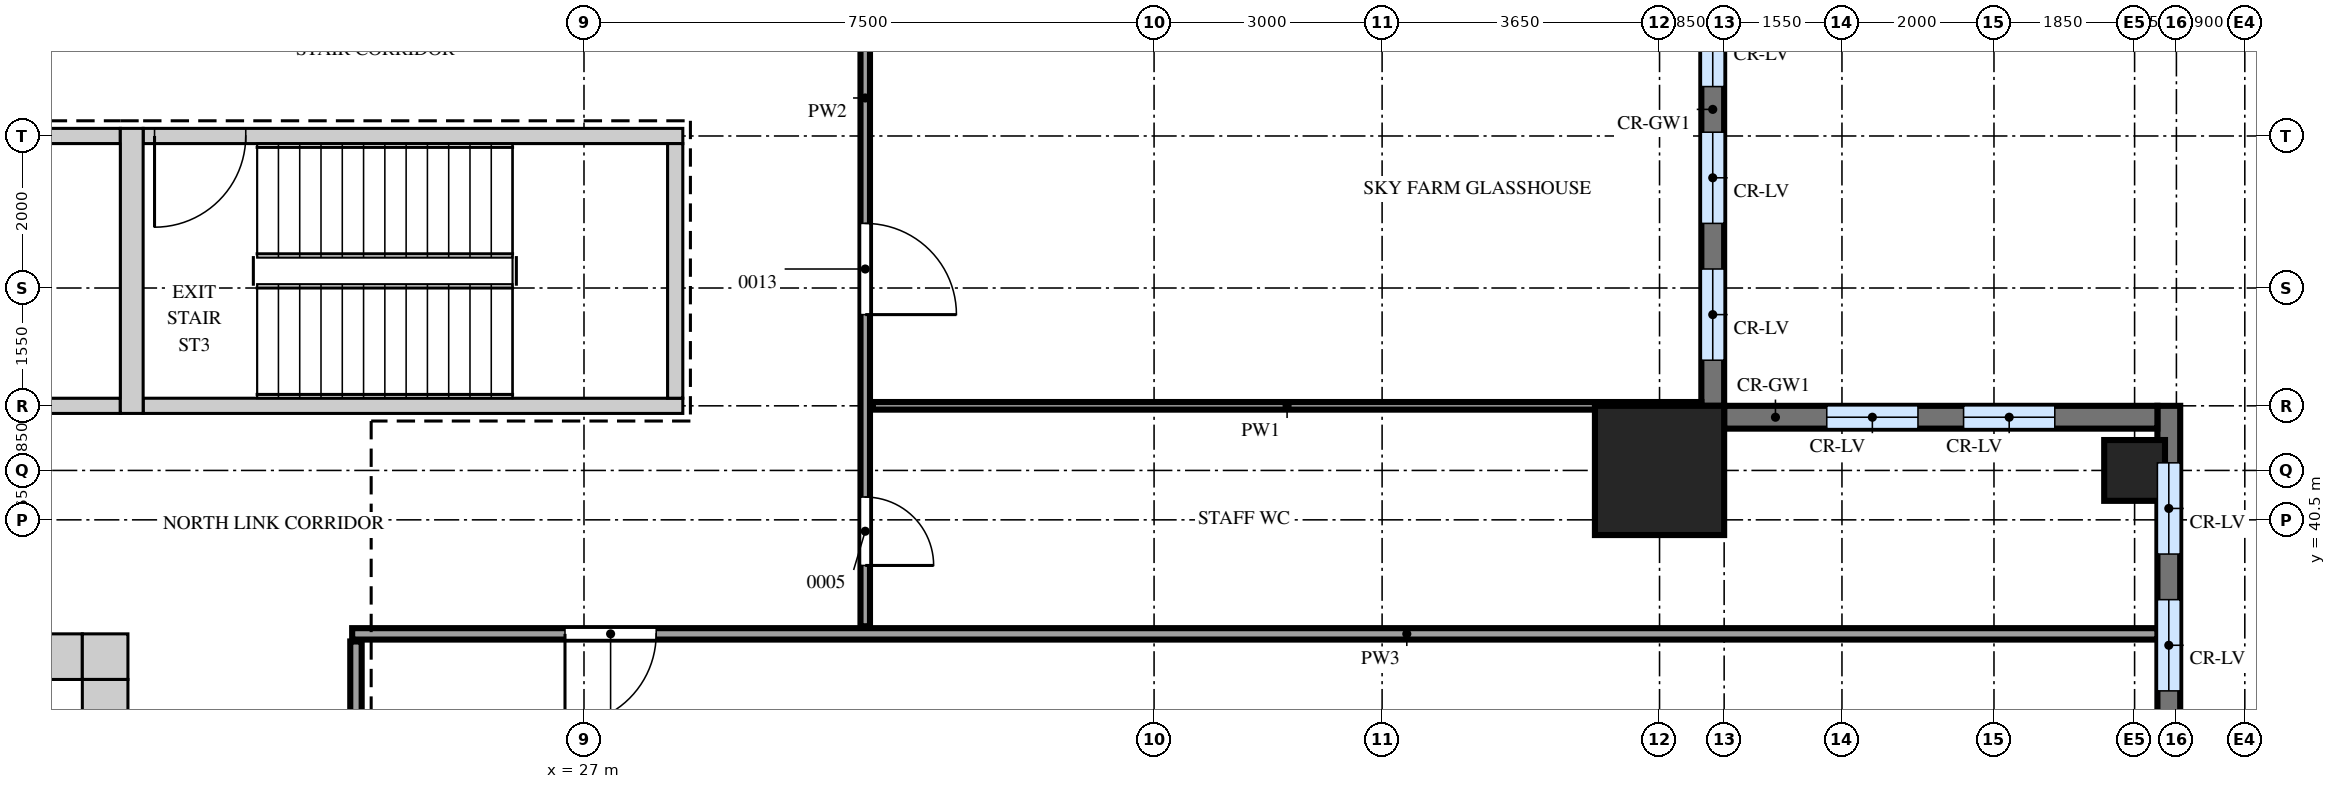
"""IFC4 building model, lengths in metres.
Left out: names, types, materials, properties, quantities, classifications, styles, units other than length and angle.
Written with IfcOpenShell. Run it as: python <this file> out.ifc"""

import sys

from ifc_helpers import new_model, si_unit, direction, frame, frame_2d, origin, origin_2d, place, context, subcontext, project, spatial, rectangle, extrude, source, transform, mapped, element, fill, save


model = new_model("IFC4")
c1 = context("Model", 3, precision=1e-05, world=origin(), true_north=direction((0.0, 1.0)))
c2 = subcontext(c1, "Body", "Model", "MODEL_VIEW")
j1 = project(units=[si_unit("LENGTHUNIT", "METRE"), si_unit("PLANEANGLEUNIT", "RADIAN")], contexts=[c1])
p1 = place(None, origin())
s1 = spatial("IfcSite", under=j1, at=p1, CompositionType="ELEMENT")
p2 = place(p1, origin())
s2 = spatial("IfcBuilding", under=s1, at=p2, CompositionType="ELEMENT")
p3 = place(p2, frame((0.0, 0.0, 330.2)))
s3 = spatial("IfcBuildingStorey", under=s2, at=p3, CompositionType="ELEMENT", Elevation=330.2)
m1 = source(origin(), c2, "Body", "SweptSolid", [
    extrude(rectangle(XDim=14.4, YDim=0.6, at=frame_2d((7.2, 0.0))), origin(), (0.0, 0.0, 1.0), 4.25),
])
p4 = place(p3, frame((6.0, 38.7, 0.0), z_axis=(0.0, 0.0, 1.0), x_axis=(1.0, 0.0, 0.0)))
e1 = element("IfcWall", 1, at=p4, inside=s3, PredefinedType="SHEAR", context=c2, shape_type="MappedRepresentation", body=[
    mapped(m1, transform((0.0, 0.0, 0.0))),
])
m2 = source(origin(), c2, "Body", "SweptSolid", [
    extrude(rectangle(XDim=0.9, YDim=2.1, at=frame_2d((0.45, 1.05))), frame((0.0, 0.31, 0.0), z_axis=(0.0, -1.0, 0.0), x_axis=(1.0, 0.0, 0.0)), (0.0, 0.0, 1.0), 0.62),
])
p5 = place(p4, frame((3.7, 0.0, 0.0)))
e2 = element("IfcOpeningElement", 2, at=p5, cuts=e1, PredefinedType="OPENING", context=c2, shape_type="MappedRepresentation", body=[
    mapped(m2, transform((0.0, 0.0, 0.0))),
])
p6 = place(p4, frame((10.4, 0.0, 0.0)))
e3 = element("IfcOpeningElement", 3, at=p6, cuts=e1, PredefinedType="OPENING", context=c2, shape_type="MappedRepresentation", body=[
    mapped(m2, transform((0.0, 0.0, 0.0))),
])
m3 = source(origin(), c2, "Body", "SweptSolid", [
    extrude(rectangle(XDim=0.6, YDim=0.6, at=frame_2d((0.3, 0.0))), origin(), (0.0, 0.0, 1.0), 4.25),
])
p7 = place(p3, frame((20.4, 38.7, 0.0), z_axis=(0.0, 0.0, 1.0), x_axis=(1.0, 0.0, 0.0)))
e4 = element("IfcWall", 4, at=p7, inside=s3, PredefinedType="SHEAR", context=c2, shape_type="MappedRepresentation", body=[
    mapped(m3, transform((0.0, 0.0, 0.0))),
])
m4 = source(origin(), c2, "Body", "SweptSolid", [
    extrude(rectangle(XDim=22.8, YDim=0.6, at=frame_2d((11.4, 0.0))), origin(), (0.0, 0.0, 1.0), 4.25),
])
p8 = place(p3, frame((20.7, 15.6, 0.0), z_axis=(0.0, 0.0, 1.0), x_axis=(0.0, 1.0, 0.0)))
e5 = element("IfcWall", 5, at=p8, inside=s3, PredefinedType="SHEAR", context=c2, shape_type="MappedRepresentation", body=[
    mapped(m4, transform((0.0, 0.0, 0.0))),
])
p9 = place(p8, frame((11.35, 0.0, 0.0)))
e6 = element("IfcOpeningElement", 6, at=p9, cuts=e5, PredefinedType="OPENING", context=c2, shape_type="MappedRepresentation", body=[
    mapped(m2, transform((0.0, 0.0, 0.0))),
])
p10 = place(p8, frame((1.55, 0.0, 0.0)))
e7 = element("IfcOpeningElement", 7, at=p10, cuts=e5, PredefinedType="OPENING", context=c2, shape_type="MappedRepresentation", body=[
    mapped(m2, transform((0.0, 0.0, 0.0))),
])
p11 = place(p8, frame((5.1, 0.0, 0.0)))
e8 = element("IfcOpeningElement", 8, at=p11, cuts=e5, PredefinedType="OPENING", context=c2, shape_type="MappedRepresentation", body=[
    mapped(m2, transform((0.0, 0.0, 0.0))),
])
m5 = source(origin(), c2, "Body", "SweptSolid", [
    extrude(rectangle(XDim=7.0, YDim=0.2, at=frame_2d((3.5, 0.0))), origin(), (0.0, 0.0, 1.0), 4.25),
])
p12 = place(p3, frame((13.9, 45.55, 0.0), z_axis=(0.0, 0.0, 1.0), x_axis=(1.0, 0.0, 0.0)))
e9 = element("IfcWall", 9, at=p12, inside=s3, PredefinedType="SHEAR", context=c2, shape_type="MappedRepresentation", body=[
    mapped(m5, transform((0.0, 0.0, 0.0))),
])
m6 = source(origin(), c2, "Body", "SweptSolid", [
    extrude(rectangle(XDim=1.2, YDim=2.1, at=frame_2d((0.6, 1.05))), frame((0.0, 0.11, 0.0), z_axis=(0.0, -1.0, 0.0), x_axis=(1.0, 0.0, 0.0)), (0.0, 0.0, 1.0), 0.22),
])
p13 = place(p12, frame((0.35, 0.0, 0.0)))
e10 = element("IfcOpeningElement", 10, at=p13, cuts=e9, PredefinedType="OPENING", context=c2, shape_type="MappedRepresentation", body=[
    mapped(m6, transform((0.0, 0.0, 0.0))),
])
p14 = place(p3, frame((13.9, 42.0, 0.0), z_axis=(0.0, 0.0, 1.0), x_axis=(1.0, 0.0, 0.0)))
e11 = element("IfcWall", 11, at=p14, inside=s3, PredefinedType="SHEAR", context=c2, shape_type="MappedRepresentation", body=[
    mapped(m5, transform((0.0, 0.0, 0.0))),
])
m7 = source(origin(), c2, "Body", "SweptSolid", [
    extrude(rectangle(XDim=7.1, YDim=0.2, at=frame_2d((3.55, 0.0))), origin(), (0.0, 0.0, 1.0), 4.25),
])
p15 = place(p3, frame((21.2, 45.55, 0.0), z_axis=(0.0, 0.0, 1.0), x_axis=(1.0, 0.0, 0.0)))
e12 = element("IfcWall", 12, at=p15, inside=s3, PredefinedType="SHEAR", context=c2, shape_type="MappedRepresentation", body=[
    mapped(m7, transform((0.0, 0.0, 0.0))),
])
p16 = place(p15, frame((0.15, 0.0, 0.0)))
e13 = element("IfcOpeningElement", 13, at=p16, cuts=e12, PredefinedType="OPENING", context=c2, shape_type="MappedRepresentation", body=[
    mapped(m6, transform((0.0, 0.0, 0.0))),
])
p17 = place(p3, frame((21.2, 42.0, 0.0), z_axis=(0.0, 0.0, 1.0), x_axis=(1.0, 0.0, 0.0)))
e14 = element("IfcWall", 14, at=p17, inside=s3, PredefinedType="SHEAR", context=c2, shape_type="MappedRepresentation", body=[
    mapped(m7, transform((0.0, 0.0, 0.0))),
])
m8 = source(origin(), c2, "Body", "SweptSolid", [
    extrude(rectangle(XDim=3.75, YDim=0.3, at=frame_2d((1.875, 0.0))), origin(), (0.0, 0.0, 1.0), 4.25),
])
p18 = place(p3, frame((21.05, 41.9, 0.0), z_axis=(0.0, 0.0, 1.0), x_axis=(0.0, 1.0, 0.0)))
e15 = element("IfcWall", 15, at=p18, inside=s3, PredefinedType="SHEAR", context=c2, shape_type="MappedRepresentation", body=[
    mapped(m8, transform((0.0, 0.0, 0.0))),
])
m9 = source(origin(), c2, "Body", "SweptSolid", [
    extrude(rectangle(XDim=3.35, YDim=0.2, at=frame_2d((1.675, 0.0))), origin(), (0.0, 0.0, 1.0), 4.25),
])
p19 = place(p3, frame((28.2, 42.1, 0.0), z_axis=(0.0, 0.0, 1.0), x_axis=(0.0, 1.0, 0.0)))
e16 = element("IfcWall", 16, at=p19, inside=s3, PredefinedType="SHEAR", context=c2, shape_type="MappedRepresentation", body=[
    mapped(m9, transform((0.0, 0.0, 0.0))),
])
m10 = source(origin(), c2, "Body", "SweptSolid", [
    extrude(rectangle(XDim=1.7, YDim=1.7, at=origin_2d()), origin(), (0.0, 0.0, 1.0), 4.5),
])
p20 = place(p3, frame((41.15, 41.15, 0.0), z_axis=(0.0, 0.0, 1.0), x_axis=(1.0, 0.0, 0.0)))
e17 = element("IfcColumn", 17, at=p20, inside=s3, PredefinedType="COLUMN", context=c2, shape_type="MappedRepresentation", body=[
    mapped(m10, transform((0.0, 0.0, 0.0))),
])
m11 = source(origin(), c2, "Body", "SweptSolid", [
    extrude(rectangle(XDim=0.8, YDim=0.8, at=origin_2d()), origin(), (0.0, 0.0, 1.0), 4.5),
])
p21 = place(p3, frame((47.4, 41.15, 0.0), z_axis=(0.0, 0.0, 1.0), x_axis=(1.0, 0.0, 0.0)))
e18 = element("IfcColumn", 18, at=p21, inside=s3, PredefinedType="COLUMN", context=c2, shape_type="MappedRepresentation", body=[
    mapped(m11, transform((0.0, 0.0, 0.0))),
])
m12 = source(origin(), c2, "Body", "SweptSolid", [
    extrude(rectangle(XDim=29.7, YDim=0.3, at=frame_2d((14.85, 0.0))), origin(), (0.0, 0.0, 1.0), 4.5),
])
p22 = place(p3, frame((47.85, 12.3, 0.0), z_axis=(0.0, 0.0, 1.0), x_axis=(0.0, 1.0, 0.0)))
e19 = element("IfcWall", 19, at=p22, inside=s3, PredefinedType="SOLIDWALL", context=c2, shape_type="MappedRepresentation", body=[
    mapped(m12, transform((0.0, 0.0, 0.0))),
])
m13 = source(origin(), c2, "Body", "SweptSolid", [
    extrude(rectangle(XDim=1.2, YDim=2.4, at=frame_2d((0.6, 1.2))), frame((0.0, 0.16, 0.0), z_axis=(0.0, -1.0, 0.0), x_axis=(1.0, 0.0, 0.0)), (0.0, 0.0, 1.0), 0.32),
])
p23 = place(p22, frame((0.75, 0.0, 0.9)))
e20 = element("IfcOpeningElement", 20, at=p23, cuts=e19, PredefinedType="OPENING", context=c2, shape_type="MappedRepresentation", body=[
    mapped(m13, transform((0.0, 0.0, 0.0))),
])
p24 = place(p22, frame((2.55, 0.0, 0.9)))
e21 = element("IfcOpeningElement", 21, at=p24, cuts=e19, PredefinedType="OPENING", context=c2, shape_type="MappedRepresentation", body=[
    mapped(m13, transform((0.0, 0.0, 0.0))),
])
p25 = place(p22, frame((4.35, 0.0, 0.9)))
e22 = element("IfcOpeningElement", 22, at=p25, cuts=e19, PredefinedType="OPENING", context=c2, shape_type="MappedRepresentation", body=[
    mapped(m13, transform((0.0, 0.0, 0.0))),
])
p26 = place(p22, frame((6.15, 0.0, 0.9)))
e23 = element("IfcOpeningElement", 23, at=p26, cuts=e19, PredefinedType="OPENING", context=c2, shape_type="MappedRepresentation", body=[
    mapped(m13, transform((0.0, 0.0, 0.0))),
])
p27 = place(p22, frame((7.95, 0.0, 0.9)))
e24 = element("IfcOpeningElement", 24, at=p27, cuts=e19, PredefinedType="OPENING", context=c2, shape_type="MappedRepresentation", body=[
    mapped(m13, transform((0.0, 0.0, 0.0))),
])
p28 = place(p22, frame((9.75, 0.0, 0.9)))
e25 = element("IfcOpeningElement", 25, at=p28, cuts=e19, PredefinedType="OPENING", context=c2, shape_type="MappedRepresentation", body=[
    mapped(m13, transform((0.0, 0.0, 0.0))),
])
p29 = place(p22, frame((11.55, 0.0, 0.9)))
e26 = element("IfcOpeningElement", 26, at=p29, cuts=e19, PredefinedType="OPENING", context=c2, shape_type="MappedRepresentation", body=[
    mapped(m13, transform((0.0, 0.0, 0.0))),
])
p30 = place(p22, frame((13.35, 0.0, 0.9)))
e27 = element("IfcOpeningElement", 27, at=p30, cuts=e19, PredefinedType="OPENING", context=c2, shape_type="MappedRepresentation", body=[
    mapped(m13, transform((0.0, 0.0, 0.0))),
])
p31 = place(p22, frame((15.15, 0.0, 0.9)))
e28 = element("IfcOpeningElement", 28, at=p31, cuts=e19, PredefinedType="OPENING", context=c2, shape_type="MappedRepresentation", body=[
    mapped(m13, transform((0.0, 0.0, 0.0))),
])
p32 = place(p22, frame((16.95, 0.0, 0.9)))
e29 = element("IfcOpeningElement", 29, at=p32, cuts=e19, PredefinedType="OPENING", context=c2, shape_type="MappedRepresentation", body=[
    mapped(m13, transform((0.0, 0.0, 0.0))),
])
p33 = place(p22, frame((18.75, 0.0, 0.9)))
e30 = element("IfcOpeningElement", 30, at=p33, cuts=e19, PredefinedType="OPENING", context=c2, shape_type="MappedRepresentation", body=[
    mapped(m13, transform((0.0, 0.0, 0.0))),
])
p34 = place(p22, frame((20.55, 0.0, 0.9)))
e31 = element("IfcOpeningElement", 31, at=p34, cuts=e19, PredefinedType="OPENING", context=c2, shape_type="MappedRepresentation", body=[
    mapped(m13, transform((0.0, 0.0, 0.0))),
])
p35 = place(p22, frame((22.35, 0.0, 0.9)))
e32 = element("IfcOpeningElement", 32, at=p35, cuts=e19, PredefinedType="OPENING", context=c2, shape_type="MappedRepresentation", body=[
    mapped(m13, transform((0.0, 0.0, 0.0))),
])
p36 = place(p22, frame((24.15, 0.0, 0.9)))
e33 = element("IfcOpeningElement", 33, at=p36, cuts=e19, PredefinedType="OPENING", context=c2, shape_type="MappedRepresentation", body=[
    mapped(m13, transform((0.0, 0.0, 0.0))),
])
p37 = place(p22, frame((25.95, 0.0, 0.9)))
e34 = element("IfcOpeningElement", 34, at=p37, cuts=e19, PredefinedType="OPENING", context=c2, shape_type="MappedRepresentation", body=[
    mapped(m13, transform((0.0, 0.0, 0.0))),
])
p38 = place(p22, frame((27.75, 0.0, 0.9)))
e35 = element("IfcOpeningElement", 35, at=p38, cuts=e19, PredefinedType="OPENING", context=c2, shape_type="MappedRepresentation", body=[
    mapped(m13, transform((0.0, 0.0, 0.0))),
])
m14 = source(origin(), c2, "Body", "SweptSolid", [
    extrude(rectangle(XDim=5.7, YDim=0.3, at=frame_2d((2.85, 0.0))), origin(), (0.0, 0.0, 1.0), 4.5),
])
p39 = place(p3, frame((47.7, 41.85, 0.0), z_axis=(0.0, 0.0, 1.0), x_axis=(-1.0, 0.0, 0.0)))
e36 = element("IfcWall", 36, at=p39, inside=s3, PredefinedType="SOLIDWALL", context=c2, shape_type="MappedRepresentation", body=[
    mapped(m14, transform((0.0, 0.0, 0.0))),
])
p40 = place(p39, frame((1.35, 0.0, 0.9)))
e37 = element("IfcOpeningElement", 37, at=p40, cuts=e36, PredefinedType="OPENING", context=c2, shape_type="MappedRepresentation", body=[
    mapped(m13, transform((0.0, 0.0, 0.0))),
])
p41 = place(p39, frame((3.15, 0.0, 0.9)))
e38 = element("IfcOpeningElement", 38, at=p41, cuts=e36, PredefinedType="OPENING", context=c2, shape_type="MappedRepresentation", body=[
    mapped(m13, transform((0.0, 0.0, 0.0))),
])
m15 = source(origin(), c2, "Body", "SweptSolid", [
    extrude(rectangle(XDim=6.0, YDim=0.3, at=frame_2d((3.0, 0.0))), origin(), (0.0, 0.0, 1.0), 4.5),
])
p42 = place(p3, frame((41.85, 42.0, 0.0), z_axis=(0.0, 0.0, 1.0), x_axis=(0.0, 1.0, 0.0)))
e39 = element("IfcWall", 39, at=p42, inside=s3, PredefinedType="SOLIDWALL", context=c2, shape_type="MappedRepresentation", body=[
    mapped(m15, transform((0.0, 0.0, 0.0))),
])
p43 = place(p42, frame((0.6, 0.0, 0.9)))
e40 = element("IfcOpeningElement", 40, at=p43, cuts=e39, PredefinedType="OPENING", context=c2, shape_type="MappedRepresentation", body=[
    mapped(m13, transform((0.0, 0.0, 0.0))),
])
p44 = place(p42, frame((2.4, 0.0, 0.9)))
e41 = element("IfcOpeningElement", 41, at=p44, cuts=e39, PredefinedType="OPENING", context=c2, shape_type="MappedRepresentation", body=[
    mapped(m13, transform((0.0, 0.0, 0.0))),
])
p45 = place(p42, frame((4.2, 0.0, 0.9)))
e42 = element("IfcOpeningElement", 42, at=p45, cuts=e39, PredefinedType="OPENING", context=c2, shape_type="MappedRepresentation", body=[
    mapped(m13, transform((0.0, 0.0, 0.0))),
])
m16 = source(origin(), c2, "Body", "SweptSolid", [
    extrude(rectangle(XDim=32.6, YDim=0.15, at=frame_2d((16.3, 0.0))), origin(), (0.0, 0.0, 1.0), 4.3),
])
p46 = place(p3, frame((24.0, 6.3, 0.0), z_axis=(0.0, 0.0, 1.0), x_axis=(0.0, 1.0, 0.0)))
e43 = element("IfcWall", 43, at=p46, inside=s3, PredefinedType="PARTITIONING", context=c2, shape_type="MappedRepresentation", body=[
    mapped(m16, transform((0.0, 0.0, 0.0))),
])
m17 = source(origin(), c2, "Body", "SweptSolid", [
    extrude(rectangle(XDim=1.2, YDim=2.1, at=frame_2d((0.6, 1.05))), frame((0.0, 0.085, 0.0), z_axis=(0.0, -1.0, 0.0), x_axis=(1.0, 0.0, 0.0)), (0.0, 0.0, 1.0), 0.17),
])
p47 = place(p46, frame((3.1, 0.0, 0.0)))
e44 = element("IfcOpeningElement", 44, at=p47, cuts=e43, PredefinedType="OPENING", context=c2, shape_type="MappedRepresentation", body=[
    mapped(m17, transform((0.0, 0.0, 0.0))),
])
p48 = place(p46, frame((12.6, 0.0, 0.0)))
e45 = element("IfcOpeningElement", 45, at=p48, cuts=e43, PredefinedType="OPENING", context=c2, shape_type="MappedRepresentation", body=[
    mapped(m17, transform((0.0, 0.0, 0.0))),
])
p49 = place(p46, frame((21.6, 0.0, 0.0)))
e46 = element("IfcOpeningElement", 46, at=p49, cuts=e43, PredefinedType="OPENING", context=c2, shape_type="MappedRepresentation", body=[
    mapped(m17, transform((0.0, 0.0, 0.0))),
])
m18 = source(origin(), c2, "Body", "SweptSolid", [
    extrude(rectangle(XDim=23.75, YDim=0.15, at=frame_2d((11.875, 0.0))), origin(), (0.0, 0.0, 1.0), 4.3),
])
p50 = place(p3, frame((23.95, 39.0, 0.0), z_axis=(0.0, 0.0, 1.0), x_axis=(1.0, 0.0, 0.0)))
e47 = element("IfcWall", 47, at=p50, inside=s3, PredefinedType="PARTITIONING", context=c2, shape_type="MappedRepresentation", body=[
    mapped(m18, transform((0.0, 0.0, 0.0))),
])
p51 = place(p50, frame((2.8, 0.0, 0.0)))
e48 = element("IfcOpeningElement", 48, at=p51, cuts=e47, PredefinedType="OPENING", context=c2, shape_type="MappedRepresentation", body=[
    mapped(m17, transform((0.0, 0.0, 0.0))),
])
m19 = source(origin(), c2, "Body", "SweptSolid", [
    extrude(rectangle(XDim=8.6, YDim=0.125, at=frame_2d((4.3, 0.0))), origin(), (0.0, 0.0, 1.0), 4.3),
])
p52 = place(p3, frame((30.7, 39.1, 0.0), z_axis=(0.0, 0.0, 1.0), x_axis=(0.0, 1.0, 0.0)))
e49 = element("IfcWall", 49, at=p52, inside=s3, PredefinedType="PARTITIONING", context=c2, shape_type="MappedRepresentation", body=[
    mapped(m19, transform((0.0, 0.0, 0.0))),
])
m20 = source(origin(), c2, "Body", "SweptSolid", [
    extrude(rectangle(XDim=0.9, YDim=2.1, at=frame_2d((0.45, 1.05))), frame((0.0, 0.073, 0.0), z_axis=(0.0, -1.0, 0.0), x_axis=(1.0, 0.0, 0.0)), (0.0, 0.0, 1.0), 0.145),
])
p53 = place(p52, frame((0.8, 0.0, 0.0)))
e50 = element("IfcOpeningElement", 50, at=p53, cuts=e49, PredefinedType="OPENING", context=c2, shape_type="MappedRepresentation", body=[
    mapped(m20, transform((0.0, 0.0, 0.0))),
])
m21 = source(origin(), c2, "Body", "SweptSolid", [
    extrude(rectangle(XDim=1.2, YDim=2.1, at=frame_2d((0.6, 1.05))), frame((0.0, 0.073, 0.0), z_axis=(0.0, -1.0, 0.0), x_axis=(1.0, 0.0, 0.0)), (0.0, 0.0, 1.0), 0.145),
])
p54 = place(p52, frame((4.1, 0.0, 0.0)))
e51 = element("IfcOpeningElement", 51, at=p54, cuts=e49, PredefinedType="OPENING", context=c2, shape_type="MappedRepresentation", body=[
    mapped(m21, transform((0.0, 0.0, 0.0))),
])
m22 = source(origin(), c2, "Body", "SweptSolid", [
    extrude(rectangle(XDim=10.9, YDim=0.1, at=frame_2d((5.45, 0.0))), origin(), (0.0, 0.0, 1.0), 4.3),
])
p55 = place(p3, frame((30.8, 42.0, 0.0), z_axis=(0.0, 0.0, 1.0), x_axis=(1.0, 0.0, 0.0)))
e52 = element("IfcWall", 52, at=p55, inside=s3, PredefinedType="PARTITIONING", context=c2, shape_type="MappedRepresentation", body=[
    mapped(m22, transform((0.0, 0.0, 0.0))),
])
m23 = source(origin(), c2, "Body", "SweptSolid", [
    extrude(rectangle(XDim=1.2, YDim=2.4, at=frame_2d((0.6, 1.2))), frame((0.0, 0.03, 0.0), z_axis=(0.0, -1.0, 0.0), x_axis=(1.0, 0.0, 0.0)), (0.0, 0.0, 1.0), 0.06),
])
p56 = place(p37, origin())
e53 = element("IfcWindow", 53, at=p56, inside=s3, PartitioningType="SINGLE_PANEL", PredefinedType="WINDOW", context=c2, shape_type="MappedRepresentation", body=[
    mapped(m23, transform((0.0, 0.0, 0.0))),
])
fill(e34, e53)
p57 = place(p38, origin())
e54 = element("IfcWindow", 54, at=p57, inside=s3, PartitioningType="SINGLE_PANEL", PredefinedType="WINDOW", context=c2, shape_type="MappedRepresentation", body=[
    mapped(m23, transform((0.0, 0.0, 0.0))),
])
fill(e35, e54)
p58 = place(p40, origin())
e55 = element("IfcWindow", 55, at=p58, inside=s3, PartitioningType="SINGLE_PANEL", PredefinedType="WINDOW", context=c2, shape_type="MappedRepresentation", body=[
    mapped(m23, transform((0.0, 0.0, 0.0))),
])
fill(e37, e55)
p59 = place(p41, origin())
e56 = element("IfcWindow", 56, at=p59, inside=s3, PartitioningType="SINGLE_PANEL", PredefinedType="WINDOW", context=c2, shape_type="MappedRepresentation", body=[
    mapped(m23, transform((0.0, 0.0, 0.0))),
])
fill(e38, e56)
p60 = place(p43, origin())
e57 = element("IfcWindow", 57, at=p60, inside=s3, PartitioningType="SINGLE_PANEL", PredefinedType="WINDOW", context=c2, shape_type="MappedRepresentation", body=[
    mapped(m23, transform((0.0, 0.0, 0.0))),
])
fill(e40, e57)
p61 = place(p44, origin())
e58 = element("IfcWindow", 58, at=p61, inside=s3, PartitioningType="SINGLE_PANEL", PredefinedType="WINDOW", context=c2, shape_type="MappedRepresentation", body=[
    mapped(m23, transform((0.0, 0.0, 0.0))),
])
fill(e41, e58)
p62 = place(p45, origin())
e59 = element("IfcWindow", 59, at=p62, inside=s3, PartitioningType="SINGLE_PANEL", PredefinedType="WINDOW", context=c2, shape_type="MappedRepresentation", body=[
    mapped(m23, transform((0.0, 0.0, 0.0))),
])
fill(e42, e59)
m24 = source(origin(), c2, "Body", "SweptSolid", [
    extrude(rectangle(XDim=1.2, YDim=2.1, at=frame_2d((0.6, 1.05))), frame((0.0, 0.025, 0.0), z_axis=(0.0, -1.0, 0.0), x_axis=(1.0, 0.0, 0.0)), (0.0, 0.0, 1.0), 0.05),
])
p63 = place(p51, origin())
e60 = element("IfcDoor", 60, at=p63, inside=s3, OperationType="SINGLE_SWING_LEFT", PredefinedType="DOOR", context=c2, shape_type="MappedRepresentation", body=[
    mapped(m24, transform((0.0, 0.0, 0.0))),
])
fill(e48, e60)
m25 = source(origin(), c2, "Body", "SweptSolid", [
    extrude(rectangle(XDim=0.9, YDim=2.1, at=frame_2d((0.45, 1.05))), frame((0.0, 0.025, 0.0), z_axis=(0.0, -1.0, 0.0), x_axis=(1.0, 0.0, 0.0)), (0.0, 0.0, 1.0), 0.05),
])
p64 = place(p53, origin())
e61 = element("IfcDoor", 61, at=p64, inside=s3, OperationType="SINGLE_SWING_LEFT", PredefinedType="DOOR", context=c2, shape_type="MappedRepresentation", body=[
    mapped(m25, transform((0.0, 0.0, 0.0))),
])
fill(e50, e61)
p65 = place(p54, origin())
e62 = element("IfcDoor", 62, at=p65, inside=s3, OperationType="SINGLE_SWING_LEFT", PredefinedType="DOOR", context=c2, shape_type="MappedRepresentation", body=[
    mapped(m24, transform((0.0, 0.0, 0.0))),
])
fill(e51, e62)
p66 = place(p16, origin())
e63 = element("IfcDoor", 63, at=p66, inside=s3, OperationType="SINGLE_SWING_LEFT", PredefinedType="DOOR", context=c2, shape_type="MappedRepresentation", body=[
    mapped(m24, transform((0.0, 0.0, 0.0))),
])
fill(e13, e63)
save(model, sys.argv[1])
